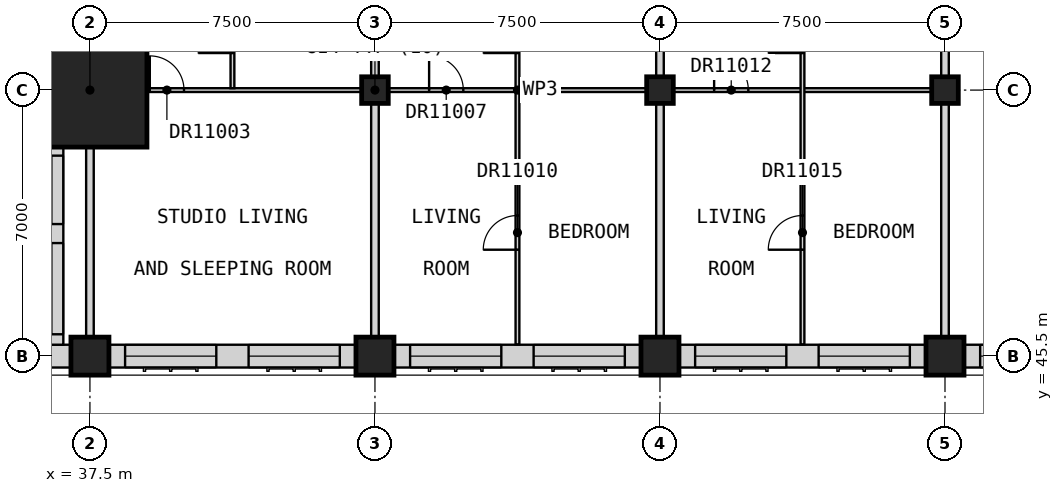
"""IFC4 building model, lengths in metres.
Left out: names, types, materials, properties, quantities, classifications, styles, units other than length and angle.
Written with IfcOpenShell. Run it as: python <this file> out.ifc"""

import sys

from ifc_helpers import new_model, si_unit, direction, frame, frame_2d, origin, origin_2d, place, context, subcontext, project, spatial, rectangle, extrude, element, fill, save


model = new_model("IFC4")
c1 = context("Model", 3, precision=1e-05, world=origin(), true_north=direction((0.0, 1.0)))
c2 = subcontext(c1, "Body", "Model", "MODEL_VIEW")
j1 = project(units=[si_unit("LENGTHUNIT", "METRE"), si_unit("PLANEANGLEUNIT", "RADIAN")], contexts=[c1])
p1 = place(None, origin())
s1 = spatial("IfcSite", under=j1, at=p1, CompositionType="ELEMENT")
p2 = place(p1, origin())
s2 = spatial("IfcBuilding", under=s1, at=p2, CompositionType="ELEMENT")
p3 = place(p2, frame((0.0, 0.0, 276.7)))
s3 = spatial("IfcBuildingStorey", under=s2, at=p3, CompositionType="ELEMENT", Elevation=276.7)
for number, where, z_axis, x_axis in (
    (1, (37.5, 45.5, 0.0), (0.0, 0.0, 1.0), (1.0, 0.0, 0.0)),
    (2, (45.0, 45.5, 0.0), (0.0, 0.0, 1.0), (1.0, 0.0, 0.0)),
):
    element("IfcColumn", number, at=place(p3, frame(where, z_axis=z_axis, x_axis=x_axis)), inside=s3, PredefinedType="COLUMN", context=c2, shape_type="SweptSolid", body=[
        extrude(rectangle(XDim=1.0, YDim=1.0, at=origin_2d()), origin(), (0.0, 0.0, 1.0), 3.5),
    ])
p4 = place(p3, frame((45.0, 52.5, 0.0), z_axis=(0.0, 0.0, 1.0), x_axis=(1.0, 0.0, 0.0)))
e3 = element("IfcColumn", 3, at=p4, inside=s3, PredefinedType="COLUMN", context=c2, shape_type="SweptSolid", body=[
    extrude(rectangle(XDim=0.7, YDim=0.7, at=origin_2d()), origin(), (0.0, 0.0, 1.0), 3.5),
])
p5 = place(p3, frame((52.5, 45.5, 0.0), z_axis=(0.0, 0.0, 1.0), x_axis=(1.0, 0.0, 0.0)))
e4 = element("IfcColumn", 4, at=p5, inside=s3, PredefinedType="COLUMN", context=c2, shape_type="SweptSolid", body=[
    extrude(rectangle(XDim=1.0, YDim=1.0, at=origin_2d()), origin(), (0.0, 0.0, 1.0), 3.5),
])
p6 = place(p3, frame((52.5, 52.5, 0.0), z_axis=(0.0, 0.0, 1.0), x_axis=(1.0, 0.0, 0.0)))
e5 = element("IfcColumn", 5, at=p6, inside=s3, PredefinedType="COLUMN", context=c2, shape_type="SweptSolid", body=[
    extrude(rectangle(XDim=0.7, YDim=0.7, at=origin_2d()), origin(), (0.0, 0.0, 1.0), 3.5),
])
p7 = place(p3, frame((60.0, 45.5, 0.0), z_axis=(0.0, 0.0, 1.0), x_axis=(1.0, 0.0, 0.0)))
e6 = element("IfcColumn", 6, at=p7, inside=s3, PredefinedType="COLUMN", context=c2, shape_type="SweptSolid", body=[
    extrude(rectangle(XDim=1.0, YDim=1.0, at=origin_2d()), origin(), (0.0, 0.0, 1.0), 3.5),
])
p8 = place(p3, frame((60.0, 52.5, 0.0), z_axis=(0.0, 0.0, 1.0), x_axis=(1.0, 0.0, 0.0)))
e7 = element("IfcColumn", 7, at=p8, inside=s3, PredefinedType="COLUMN", context=c2, shape_type="SweptSolid", body=[
    extrude(rectangle(XDim=0.7, YDim=0.7, at=origin_2d()), origin(), (0.0, 0.0, 1.0), 3.5),
])
p9 = place(p3, frame((37.5, 52.5, 0.0), z_axis=(0.0, 0.0, 1.0), x_axis=(1.0, 0.0, 0.0)))
e8 = element("IfcColumn", 8, at=p9, inside=s3, PredefinedType="COLUMN", context=c2, shape_type="SweptSolid", body=[
    extrude(rectangle(XDim=3.0, YDim=3.0, at=origin_2d()), origin(), (0.0, 0.0, 1.0), 3.5),
])
p10 = place(p3, frame((36.0, 45.5, 0.0), z_axis=(0.0, 0.0, 1.0), x_axis=(1.0, 0.0, 0.0)))
e9 = element("IfcWall", 9, at=p10, inside=s3, PredefinedType="SOLIDWALL", context=c2, shape_type="SweptSolid", body=[
    extrude(rectangle(XDim=1.0, YDim=0.6, at=frame_2d((0.5, 0.0))), origin(), (0.0, 0.0, 1.0), 3.25),
])
p11 = place(p3, frame((38.0, 45.5, 0.0), z_axis=(0.0, 0.0, 1.0), x_axis=(1.0, 0.0, 0.0)))
e10 = element("IfcWall", 10, at=p11, inside=s3, PredefinedType="SOLIDWALL", context=c2, shape_type="SweptSolid", body=[
    extrude(rectangle(XDim=6.5, YDim=0.6, at=frame_2d((3.25, 0.0))), origin(), (0.0, 0.0, 1.0), 2.75),
])
p12 = place(p11, frame((0.425, 0.0, 0.8)))
e11 = element("IfcOpeningElement", 11, at=p12, cuts=e10, PredefinedType="OPENING", context=c2, shape_type="SweptSolid", body=[
    extrude(rectangle(XDim=2.4, YDim=1.8, at=frame_2d((1.2, 0.9))), frame((0.0, 0.31, 0.0), z_axis=(0.0, -1.0, 0.0), x_axis=(1.0, 0.0, 0.0)), (0.0, 0.0, 1.0), 0.62),
])
p13 = place(p11, frame((3.675, 0.0, 0.8)))
e12 = element("IfcOpeningElement", 12, at=p13, cuts=e10, PredefinedType="OPENING", context=c2, shape_type="SweptSolid", body=[
    extrude(rectangle(XDim=2.4, YDim=1.8, at=frame_2d((1.2, 0.9))), frame((0.0, 0.31, 0.0), z_axis=(0.0, -1.0, 0.0), x_axis=(1.0, 0.0, 0.0)), (0.0, 0.0, 1.0), 0.62),
])
p14 = place(p3, frame((45.5, 45.5, 0.0), z_axis=(0.0, 0.0, 1.0), x_axis=(1.0, 0.0, 0.0)))
e13 = element("IfcWall", 13, at=p14, inside=s3, PredefinedType="SOLIDWALL", context=c2, shape_type="SweptSolid", body=[
    extrude(rectangle(XDim=6.5, YDim=0.6, at=frame_2d((3.25, 0.0))), origin(), (0.0, 0.0, 1.0), 2.75),
])
p15 = place(p14, frame((0.425, 0.0, 0.8)))
e14 = element("IfcOpeningElement", 14, at=p15, cuts=e13, PredefinedType="OPENING", context=c2, shape_type="SweptSolid", body=[
    extrude(rectangle(XDim=2.4, YDim=1.8, at=frame_2d((1.2, 0.9))), frame((0.0, 0.31, 0.0), z_axis=(0.0, -1.0, 0.0), x_axis=(1.0, 0.0, 0.0)), (0.0, 0.0, 1.0), 0.62),
])
p16 = place(p14, frame((3.675, 0.0, 0.8)))
e15 = element("IfcOpeningElement", 15, at=p16, cuts=e13, PredefinedType="OPENING", context=c2, shape_type="SweptSolid", body=[
    extrude(rectangle(XDim=2.4, YDim=1.8, at=frame_2d((1.2, 0.9))), frame((0.0, 0.31, 0.0), z_axis=(0.0, -1.0, 0.0), x_axis=(1.0, 0.0, 0.0)), (0.0, 0.0, 1.0), 0.62),
])
p17 = place(p3, frame((53.0, 45.5, 0.0), z_axis=(0.0, 0.0, 1.0), x_axis=(1.0, 0.0, 0.0)))
e16 = element("IfcWall", 16, at=p17, inside=s3, PredefinedType="SOLIDWALL", context=c2, shape_type="SweptSolid", body=[
    extrude(rectangle(XDim=6.5, YDim=0.6, at=frame_2d((3.25, 0.0))), origin(), (0.0, 0.0, 1.0), 2.75),
])
p18 = place(p17, frame((0.425, 0.0, 0.8)))
e17 = element("IfcOpeningElement", 17, at=p18, cuts=e16, PredefinedType="OPENING", context=c2, shape_type="SweptSolid", body=[
    extrude(rectangle(XDim=2.4, YDim=1.8, at=frame_2d((1.2, 0.9))), frame((0.0, 0.31, 0.0), z_axis=(0.0, -1.0, 0.0), x_axis=(1.0, 0.0, 0.0)), (0.0, 0.0, 1.0), 0.62),
])
p19 = place(p17, frame((3.675, 0.0, 0.8)))
e18 = element("IfcOpeningElement", 18, at=p19, cuts=e16, PredefinedType="OPENING", context=c2, shape_type="SweptSolid", body=[
    extrude(rectangle(XDim=2.4, YDim=1.8, at=frame_2d((1.2, 0.9))), frame((0.0, 0.31, 0.0), z_axis=(0.0, -1.0, 0.0), x_axis=(1.0, 0.0, 0.0)), (0.0, 0.0, 1.0), 0.62),
])
p20 = place(p3, frame((60.5, 45.5, 0.0), z_axis=(0.0, 0.0, 1.0), x_axis=(1.0, 0.0, 0.0)))
e19 = element("IfcWall", 19, at=p20, inside=s3, PredefinedType="SOLIDWALL", context=c2, shape_type="SweptSolid", body=[
    extrude(rectangle(XDim=6.5, YDim=0.6, at=frame_2d((3.25, 0.0))), origin(), (0.0, 0.0, 1.0), 2.75),
])
p21 = place(p20, frame((0.425, 0.0, 0.8)))
e20 = element("IfcOpeningElement", 20, at=p21, cuts=e19, PredefinedType="OPENING", context=c2, shape_type="SweptSolid", body=[
    extrude(rectangle(XDim=2.4, YDim=1.8, at=frame_2d((1.2, 0.9))), frame((0.0, 0.31, 0.0), z_axis=(0.0, -1.0, 0.0), x_axis=(1.0, 0.0, 0.0)), (0.0, 0.0, 1.0), 0.62),
])
p22 = place(p20, frame((3.675, 0.0, 0.8)))
e21 = element("IfcOpeningElement", 21, at=p22, cuts=e19, PredefinedType="OPENING", context=c2, shape_type="SweptSolid", body=[
    extrude(rectangle(XDim=2.4, YDim=1.8, at=frame_2d((1.2, 0.9))), frame((0.0, 0.31, 0.0), z_axis=(0.0, -1.0, 0.0), x_axis=(1.0, 0.0, 0.0)), (0.0, 0.0, 1.0), 0.62),
])
p23 = place(p3, frame((36.5, 51.0, 0.0), z_axis=(0.0, 0.0, 1.0), x_axis=(0.0, -1.0, 0.0)))
e22 = element("IfcWall", 22, at=p23, inside=s3, PredefinedType="SOLIDWALL", context=c2, shape_type="SweptSolid", body=[
    extrude(rectangle(XDim=5.2, YDim=0.6, at=frame_2d((2.6, 0.0))), origin(), (0.0, 0.0, 1.0), 3.25),
])
p24 = place(p23, frame((2.525, 0.0, 0.8)))
e23 = element("IfcOpeningElement", 23, at=p24, cuts=e22, PredefinedType="OPENING", context=c2, shape_type="SweptSolid", body=[
    extrude(rectangle(XDim=2.4, YDim=1.8, at=frame_2d((1.2, 0.9))), frame((0.0, 0.31, 0.0), z_axis=(0.0, -1.0, 0.0), x_axis=(1.0, 0.0, 0.0)), (0.0, 0.0, 1.0), 0.62),
])
p25 = place(p23, frame((0.225, 0.0, 0.8)))
e24 = element("IfcOpeningElement", 24, at=p25, cuts=e22, PredefinedType="OPENING", context=c2, shape_type="SweptSolid", body=[
    extrude(rectangle(XDim=1.8, YDim=1.8, at=frame_2d((0.9, 0.9))), frame((0.0, 0.31, 0.0), z_axis=(0.0, -1.0, 0.0), x_axis=(1.0, 0.0, 0.0)), (0.0, 0.0, 1.0), 0.62),
])
p26 = place(p3, frame((37.5, 45.0, 0.0), z_axis=(0.0, 0.0, 1.0), x_axis=(0.0, 1.0, 0.0)))
e25 = element("IfcWall", 25, at=p26, inside=s3, PredefinedType="PARTITIONING", context=c2, shape_type="SweptSolid", body=[
    extrude(rectangle(XDim=13.125, YDim=0.2, at=frame_2d((6.562, 0.0))), origin(), (0.0, 0.0, 1.0), 2.75),
])
for number, where, z_axis, x_axis in (
    (26, (45.0, 45.0, 0.0), (0.0, 0.0, 1.0), (0.0, 1.0, 0.0)),
    (27, (52.5, 45.0, 0.0), (0.0, 0.0, 1.0), (0.0, 1.0, 0.0)),
    (28, (60.0, 45.0, 0.0), (0.0, 0.0, 1.0), (0.0, 1.0, 0.0)),
):
    element("IfcWall", number, at=place(p3, frame(where, z_axis=z_axis, x_axis=x_axis)), inside=s3, PredefinedType="PARTITIONING", context=c2, shape_type="SweptSolid", body=[
        extrude(rectangle(XDim=13.125, YDim=0.2, at=frame_2d((6.562, 0.0))), origin(), (0.0, 0.0, 1.0), 3.25),
    ])
p27 = place(p3, frame((37.6, 52.5, 0.0), z_axis=(0.0, 0.0, 1.0), x_axis=(1.0, 0.0, 0.0)))
e29 = element("IfcWall", 29, at=p27, inside=s3, PredefinedType="PARTITIONING", context=c2, shape_type="SweptSolid", body=[
    extrude(rectangle(XDim=22.3, YDim=0.1, at=frame_2d((11.15, 0.0))), origin(), (0.0, 0.0, 1.0), 3.25),
])
p28 = place(p27, frame((1.475, 0.0, 0.0)))
e30 = element("IfcOpeningElement", 30, at=p28, cuts=e29, PredefinedType="OPENING", context=c2, shape_type="SweptSolid", body=[
    extrude(rectangle(XDim=0.9, YDim=2.1, at=frame_2d((0.45, 1.05))), frame((0.0, 0.06, 0.0), z_axis=(0.0, -1.0, 0.0), x_axis=(1.0, 0.0, 0.0)), (0.0, 0.0, 1.0), 0.12),
])
p29 = place(p27, frame((8.825, 0.0, 0.0)))
e31 = element("IfcOpeningElement", 31, at=p29, cuts=e29, PredefinedType="OPENING", context=c2, shape_type="SweptSolid", body=[
    extrude(rectangle(XDim=0.9, YDim=2.1, at=frame_2d((0.45, 1.05))), frame((0.0, 0.06, 0.0), z_axis=(0.0, -1.0, 0.0), x_axis=(1.0, 0.0, 0.0)), (0.0, 0.0, 1.0), 0.12),
])
p30 = place(p27, frame((16.325, 0.0, 0.0)))
e32 = element("IfcOpeningElement", 32, at=p30, cuts=e29, PredefinedType="OPENING", context=c2, shape_type="SweptSolid", body=[
    extrude(rectangle(XDim=0.9, YDim=2.1, at=frame_2d((0.45, 1.05))), frame((0.0, 0.06, 0.0), z_axis=(0.0, -1.0, 0.0), x_axis=(1.0, 0.0, 0.0)), (0.0, 0.0, 1.0), 0.12),
])
p31 = place(p3, frame((41.25, 52.55, 0.0), z_axis=(0.0, 0.0, 1.0), x_axis=(0.0, 1.0, 0.0)))
e33 = element("IfcWall", 33, at=p31, inside=s3, PredefinedType="PARTITIONING", context=c2, shape_type="SweptSolid", body=[
    extrude(rectangle(XDim=2.738, YDim=0.1, at=frame_2d((1.369, 0.0))), origin(), (0.0, 0.0, 1.0), 3.25),
])
p32 = place(p31, frame((0.925, 0.0, 0.0)))
e34 = element("IfcOpeningElement", 34, at=p32, cuts=e33, PredefinedType="OPENING", context=c2, shape_type="SweptSolid", body=[
    extrude(rectangle(XDim=0.9, YDim=2.1, at=frame_2d((0.45, 1.05))), frame((0.0, 0.06, 0.0), z_axis=(0.0, -1.0, 0.0), x_axis=(1.0, 0.0, 0.0)), (0.0, 0.0, 1.0), 0.12),
])
p33 = place(p3, frame((48.75, 45.81, 0.0), z_axis=(0.0, 0.0, 1.0), x_axis=(0.0, 1.0, 0.0)))
e35 = element("IfcWall", 35, at=p33, inside=s3, PredefinedType="PARTITIONING", context=c2, shape_type="SweptSolid", body=[
    extrude(rectangle(XDim=9.478, YDim=0.1, at=frame_2d((4.739, 0.0))), origin(), (0.0, 0.0, 1.0), 3.25),
])
p34 = place(p33, frame((7.665, 0.0, 0.0)))
e36 = element("IfcOpeningElement", 36, at=p34, cuts=e35, PredefinedType="OPENING", context=c2, shape_type="SweptSolid", body=[
    extrude(rectangle(XDim=0.9, YDim=2.1, at=frame_2d((0.45, 1.05))), frame((0.0, 0.06, 0.0), z_axis=(0.0, -1.0, 0.0), x_axis=(1.0, 0.0, 0.0)), (0.0, 0.0, 1.0), 0.12),
])
p35 = place(p33, frame((2.49, 0.0, 0.0)))
e37 = element("IfcOpeningElement", 37, at=p35, cuts=e35, PredefinedType="OPENING", context=c2, shape_type="SweptSolid", body=[
    extrude(rectangle(XDim=0.9, YDim=2.1, at=frame_2d((0.45, 1.05))), frame((0.0, 0.06, 0.0), z_axis=(0.0, -1.0, 0.0), x_axis=(1.0, 0.0, 0.0)), (0.0, 0.0, 1.0), 0.12),
])
p36 = place(p3, frame((56.25, 45.81, 0.0), z_axis=(0.0, 0.0, 1.0), x_axis=(0.0, 1.0, 0.0)))
e38 = element("IfcWall", 38, at=p36, inside=s3, PredefinedType="PARTITIONING", context=c2, shape_type="SweptSolid", body=[
    extrude(rectangle(XDim=9.478, YDim=0.1, at=frame_2d((4.739, 0.0))), origin(), (0.0, 0.0, 1.0), 3.25),
])
p37 = place(p36, frame((7.665, 0.0, 0.0)))
e39 = element("IfcOpeningElement", 39, at=p37, cuts=e38, PredefinedType="OPENING", context=c2, shape_type="SweptSolid", body=[
    extrude(rectangle(XDim=0.9, YDim=2.1, at=frame_2d((0.45, 1.05))), frame((0.0, 0.06, 0.0), z_axis=(0.0, -1.0, 0.0), x_axis=(1.0, 0.0, 0.0)), (0.0, 0.0, 1.0), 0.12),
])
p38 = place(p36, frame((2.49, 0.0, 0.0)))
e40 = element("IfcOpeningElement", 40, at=p38, cuts=e38, PredefinedType="OPENING", context=c2, shape_type="SweptSolid", body=[
    extrude(rectangle(XDim=0.9, YDim=2.1, at=frame_2d((0.45, 1.05))), frame((0.0, 0.06, 0.0), z_axis=(0.0, -1.0, 0.0), x_axis=(1.0, 0.0, 0.0)), (0.0, 0.0, 1.0), 0.12),
])
p39 = place(p12, origin())
e41 = element("IfcWindow", 41, at=p39, inside=s3, PartitioningType="SINGLE_PANEL", PredefinedType="WINDOW", context=c2, shape_type="SweptSolid", body=[
    extrude(rectangle(XDim=2.4, YDim=1.8, at=frame_2d((1.2, 0.9))), frame((0.0, -0.07, 0.0), z_axis=(0.0, -1.0, 0.0), x_axis=(1.0, 0.0, 0.0)), (0.0, 0.0, 1.0), 0.06),
])
fill(e11, e41)
p40 = place(p13, origin())
e42 = element("IfcWindow", 42, at=p40, inside=s3, PartitioningType="SINGLE_PANEL", PredefinedType="WINDOW", context=c2, shape_type="SweptSolid", body=[
    extrude(rectangle(XDim=2.4, YDim=1.8, at=frame_2d((1.2, 0.9))), frame((0.0, -0.07, 0.0), z_axis=(0.0, -1.0, 0.0), x_axis=(1.0, 0.0, 0.0)), (0.0, 0.0, 1.0), 0.06),
])
fill(e12, e42)
p41 = place(p15, origin())
e43 = element("IfcWindow", 43, at=p41, inside=s3, PartitioningType="SINGLE_PANEL", PredefinedType="WINDOW", context=c2, shape_type="SweptSolid", body=[
    extrude(rectangle(XDim=2.4, YDim=1.8, at=frame_2d((1.2, 0.9))), frame((0.0, -0.07, 0.0), z_axis=(0.0, -1.0, 0.0), x_axis=(1.0, 0.0, 0.0)), (0.0, 0.0, 1.0), 0.06),
])
fill(e14, e43)
p42 = place(p16, origin())
e44 = element("IfcWindow", 44, at=p42, inside=s3, PartitioningType="SINGLE_PANEL", PredefinedType="WINDOW", context=c2, shape_type="SweptSolid", body=[
    extrude(rectangle(XDim=2.4, YDim=1.8, at=frame_2d((1.2, 0.9))), frame((0.0, -0.07, 0.0), z_axis=(0.0, -1.0, 0.0), x_axis=(1.0, 0.0, 0.0)), (0.0, 0.0, 1.0), 0.06),
])
fill(e15, e44)
p43 = place(p18, origin())
e45 = element("IfcWindow", 45, at=p43, inside=s3, PartitioningType="SINGLE_PANEL", PredefinedType="WINDOW", context=c2, shape_type="SweptSolid", body=[
    extrude(rectangle(XDim=2.4, YDim=1.8, at=frame_2d((1.2, 0.9))), frame((0.0, -0.07, 0.0), z_axis=(0.0, -1.0, 0.0), x_axis=(1.0, 0.0, 0.0)), (0.0, 0.0, 1.0), 0.06),
])
fill(e17, e45)
p44 = place(p19, origin())
e46 = element("IfcWindow", 46, at=p44, inside=s3, PartitioningType="SINGLE_PANEL", PredefinedType="WINDOW", context=c2, shape_type="SweptSolid", body=[
    extrude(rectangle(XDim=2.4, YDim=1.8, at=frame_2d((1.2, 0.9))), frame((0.0, -0.07, 0.0), z_axis=(0.0, -1.0, 0.0), x_axis=(1.0, 0.0, 0.0)), (0.0, 0.0, 1.0), 0.06),
])
fill(e18, e46)
p45 = place(p21, origin())
e47 = element("IfcWindow", 47, at=p45, inside=s3, PartitioningType="SINGLE_PANEL", PredefinedType="WINDOW", context=c2, shape_type="SweptSolid", body=[
    extrude(rectangle(XDim=2.4, YDim=1.8, at=frame_2d((1.2, 0.9))), frame((0.0, -0.07, 0.0), z_axis=(0.0, -1.0, 0.0), x_axis=(1.0, 0.0, 0.0)), (0.0, 0.0, 1.0), 0.06),
])
fill(e20, e47)
p46 = place(p28, origin())
e48 = element("IfcDoor", 48, at=p46, inside=s3, OperationType="SINGLE_SWING_RIGHT", PredefinedType="DOOR", context=c2, shape_type="SweptSolid", body=[
    extrude(rectangle(XDim=0.9, YDim=2.1, at=frame_2d((0.45, 1.05))), frame((0.0, 0.025, 0.0), z_axis=(0.0, -1.0, 0.0), x_axis=(1.0, 0.0, 0.0)), (0.0, 0.0, 1.0), 0.05),
])
fill(e30, e48)
p47 = place(p32, origin())
e49 = element("IfcDoor", 49, at=p47, inside=s3, OperationType="SINGLE_SWING_RIGHT", PredefinedType="DOOR", context=c2, shape_type="SweptSolid", body=[
    extrude(rectangle(XDim=0.9, YDim=2.1, at=frame_2d((0.45, 1.05))), frame((0.0, 0.025, 0.0), z_axis=(0.0, -1.0, 0.0), x_axis=(1.0, 0.0, 0.0)), (0.0, 0.0, 1.0), 0.05),
])
fill(e34, e49)
p48 = place(p29, origin())
e50 = element("IfcDoor", 50, at=p48, inside=s3, OperationType="SINGLE_SWING_LEFT", PredefinedType="DOOR", context=c2, shape_type="SweptSolid", body=[
    extrude(rectangle(XDim=0.9, YDim=2.1, at=frame_2d((0.45, 1.05))), frame((0.0, 0.025, 0.0), z_axis=(0.0, -1.0, 0.0), x_axis=(1.0, 0.0, 0.0)), (0.0, 0.0, 1.0), 0.05),
])
fill(e31, e50)
p49 = place(p34, origin())
e51 = element("IfcDoor", 51, at=p49, inside=s3, OperationType="SINGLE_SWING_RIGHT", PredefinedType="DOOR", context=c2, shape_type="SweptSolid", body=[
    extrude(rectangle(XDim=0.9, YDim=2.1, at=frame_2d((0.45, 1.05))), frame((0.0, 0.025, 0.0), z_axis=(0.0, -1.0, 0.0), x_axis=(1.0, 0.0, 0.0)), (0.0, 0.0, 1.0), 0.05),
])
fill(e36, e51)
p50 = place(p35, origin())
e52 = element("IfcDoor", 52, at=p50, inside=s3, OperationType="SINGLE_SWING_LEFT", PredefinedType="DOOR", context=c2, shape_type="SweptSolid", body=[
    extrude(rectangle(XDim=0.9, YDim=2.1, at=frame_2d((0.45, 1.05))), frame((0.0, 0.025, 0.0), z_axis=(0.0, -1.0, 0.0), x_axis=(1.0, 0.0, 0.0)), (0.0, 0.0, 1.0), 0.05),
])
fill(e37, e52)
p51 = place(p30, origin())
e53 = element("IfcDoor", 53, at=p51, inside=s3, OperationType="SINGLE_SWING_LEFT", PredefinedType="DOOR", context=c2, shape_type="SweptSolid", body=[
    extrude(rectangle(XDim=0.9, YDim=2.1, at=frame_2d((0.45, 1.05))), frame((0.0, 0.025, 0.0), z_axis=(0.0, -1.0, 0.0), x_axis=(1.0, 0.0, 0.0)), (0.0, 0.0, 1.0), 0.05),
])
fill(e32, e53)
p52 = place(p37, origin())
e54 = element("IfcDoor", 54, at=p52, inside=s3, OperationType="SINGLE_SWING_RIGHT", PredefinedType="DOOR", context=c2, shape_type="SweptSolid", body=[
    extrude(rectangle(XDim=0.9, YDim=2.1, at=frame_2d((0.45, 1.05))), frame((0.0, 0.025, 0.0), z_axis=(0.0, -1.0, 0.0), x_axis=(1.0, 0.0, 0.0)), (0.0, 0.0, 1.0), 0.05),
])
fill(e39, e54)
p53 = place(p38, origin())
e55 = element("IfcDoor", 55, at=p53, inside=s3, OperationType="SINGLE_SWING_LEFT", PredefinedType="DOOR", context=c2, shape_type="SweptSolid", body=[
    extrude(rectangle(XDim=0.9, YDim=2.1, at=frame_2d((0.45, 1.05))), frame((0.0, 0.025, 0.0), z_axis=(0.0, -1.0, 0.0), x_axis=(1.0, 0.0, 0.0)), (0.0, 0.0, 1.0), 0.05),
])
fill(e40, e55)
save(model, sys.argv[1])
